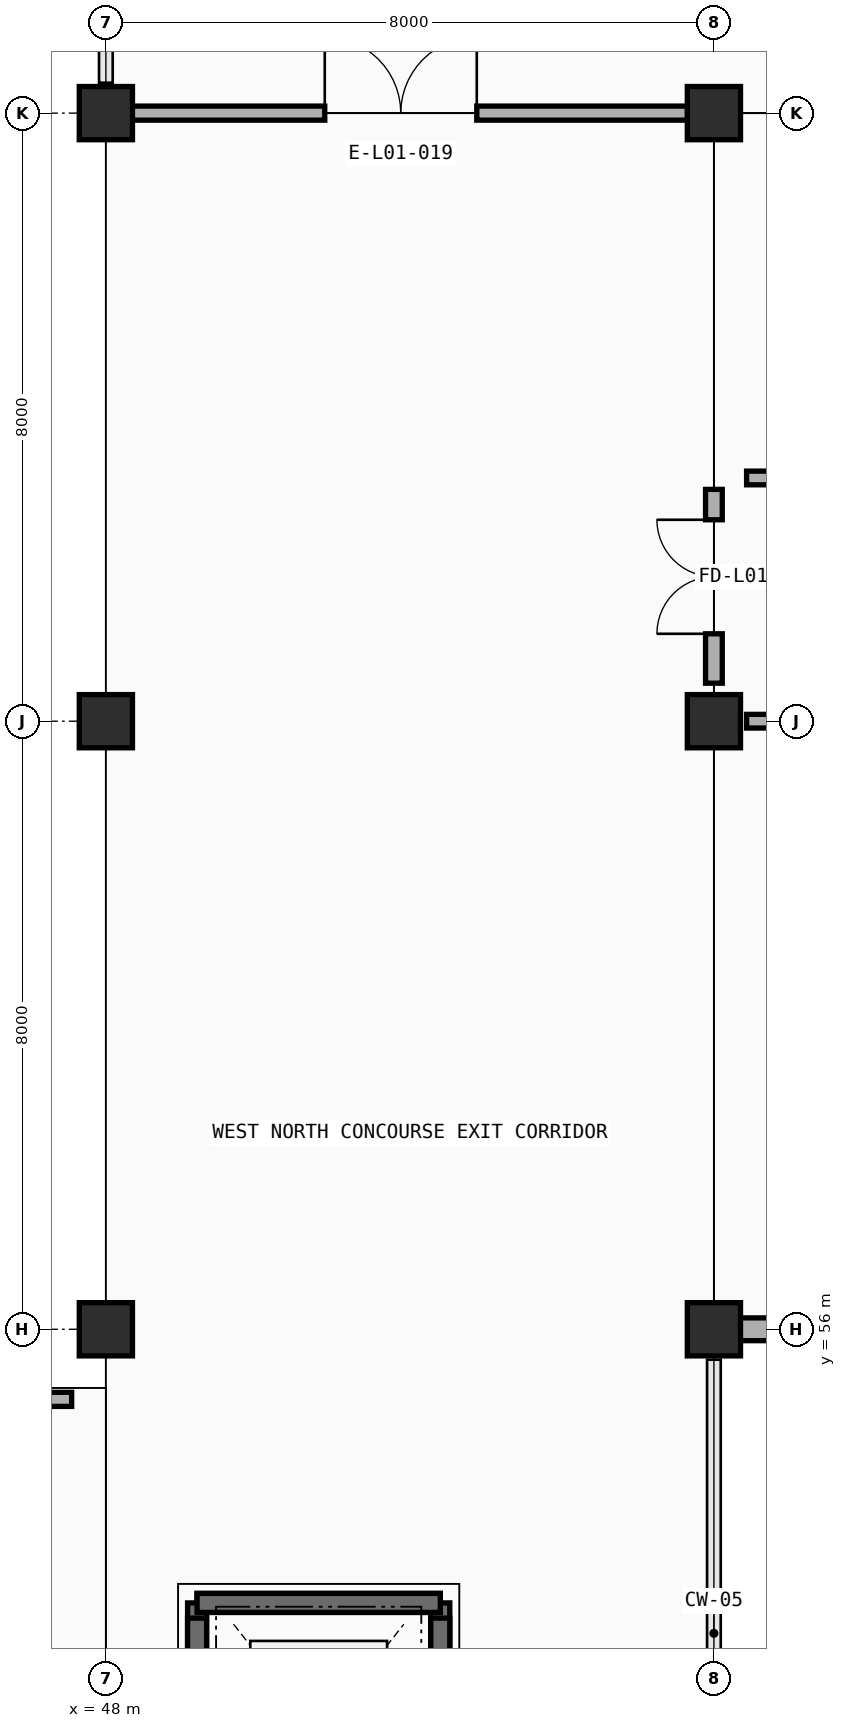
"""IFC4 building model, lengths in metres.
Left out: names, types, materials, properties, quantities, classifications, styles, units other than length and angle.
Written with IfcOpenShell. Run it as: python <this file> out.ifc"""

import sys

from ifc_helpers import new_model, si_unit, direction, frame, frame_2d, origin, origin_2d, place, context, subcontext, project, spatial, rectangle, extrude, element, fill, save


model = new_model("IFC4")
c1 = context("Model", 3, precision=1e-05, world=origin(), true_north=direction((0.0, 1.0)))
c2 = subcontext(c1, "Body", "Model", "MODEL_VIEW")
j1 = project(units=[si_unit("LENGTHUNIT", "METRE"), si_unit("PLANEANGLEUNIT", "RADIAN")], contexts=[c1])
p1 = place(None, origin())
s1 = spatial("IfcSite", under=j1, at=p1, CompositionType="ELEMENT")
p2 = place(p1, origin())
s2 = spatial("IfcBuilding", under=s1, at=p2, CompositionType="ELEMENT")
p3 = place(p2, origin())
s3 = spatial("IfcBuildingStorey", under=s2, at=p3, CompositionType="ELEMENT", Elevation=0.0)
for number, where, z_axis, x_axis in (
    (1, (48.0, 56.0, 0.0), (0.0, 0.0, 1.0), (1.0, 0.0, 0.0)),
    (2, (56.0, 56.0, 0.0), (0.0, 0.0, 1.0), (1.0, 0.0, 0.0)),
    (3, (48.0, 64.0, 0.0), (0.0, 0.0, 1.0), (1.0, 0.0, 0.0)),
    (4, (56.0, 64.0, 0.0), (0.0, 0.0, 1.0), (1.0, 0.0, 0.0)),
    (5, (48.0, 72.0, 0.0), (0.0, 0.0, 1.0), (1.0, 0.0, 0.0)),
    (6, (56.0, 72.0, 0.0), (0.0, 0.0, 1.0), (1.0, 0.0, 0.0)),
):
    element("IfcColumn", number, at=place(p3, frame(where, z_axis=z_axis, x_axis=x_axis)), inside=s3, PredefinedType="COLUMN", context=c2, shape_type="SweptSolid", body=[
        extrude(rectangle(XDim=0.7, YDim=0.7, at=origin_2d()), origin(), (0.0, 0.0, 1.0), 4.8),
    ])
p4 = place(p3, frame((63.628, 56.0, 0.0), z_axis=(0.0, 0.0, 1.0), x_axis=(-1.0, 0.0, 0.0)))
e7 = element("IfcWall", 7, at=p4, inside=s3, PredefinedType="STANDARD", context=c2, shape_type="SweptSolid", body=[
    extrude(rectangle(XDim=7.281, YDim=0.3, at=frame_2d((3.641, 0.0))), origin(), (0.0, 0.0, 1.0), 3.91),
])
p5 = place(p4, frame((2.208, 0.0, 0.9)))
e8 = element("IfcOpeningElement", 8, at=p5, cuts=e7, PredefinedType="OPENING", context=c2, shape_type="SweptSolid", body=[
    extrude(rectangle(XDim=2.45, YDim=1.85, at=frame_2d((1.225, 0.925))), frame((0.0, 0.16, 0.0), z_axis=(0.0, -1.0, 0.0), x_axis=(1.0, 0.0, 0.0)), (0.0, 0.0, 1.0), 0.32),
])
p6 = place(p3, frame((48.347, 72.0, 0.0), z_axis=(0.0, 0.0, 1.0), x_axis=(1.0, 0.0, 0.0)))
e9 = element("IfcWall", 9, at=p6, inside=s3, PredefinedType="STANDARD", context=c2, shape_type="SweptSolid", body=[
    extrude(rectangle(XDim=7.306, YDim=0.185, at=frame_2d((3.653, 0.0))), origin(), (0.0, 0.0, 1.0), 3.91),
])
p7 = place(p6, frame((2.533, 0.0, 0.0)))
e10 = element("IfcOpeningElement", 10, at=p7, cuts=e9, PredefinedType="OPENING", context=c2, shape_type="SweptSolid", body=[
    extrude(rectangle(XDim=2.0, YDim=2.4, at=frame_2d((1.0, 1.2))), frame((0.0, 0.103, 0.0), z_axis=(0.0, -1.0, 0.0), x_axis=(1.0, 0.0, 0.0)), (0.0, 0.0, 1.0), 0.205),
])
p8 = place(p3, frame((42.372, 55.078, 0.0), z_axis=(0.0, 0.0, 1.0), x_axis=(1.0, 0.0, 0.0)))
e11 = element("IfcWall", 11, at=p8, inside=s3, PredefinedType="STANDARD", context=c2, shape_type="SweptSolid", body=[
    extrude(rectangle(XDim=5.178, YDim=0.185, at=frame_2d((2.589, 0.0))), origin(), (0.0, 0.0, 1.0), 3.925),
])
p9 = place(p8, frame((1.878, 0.0, 0.9)))
e12 = element("IfcOpeningElement", 12, at=p9, cuts=e11, PredefinedType="OPENING", context=c2, shape_type="SweptSolid", body=[
    extrude(rectangle(XDim=1.25, YDim=1.25, at=frame_2d((0.625, 0.625))), frame((0.0, 0.103, 0.0), z_axis=(0.0, -1.0, 0.0), x_axis=(1.0, 0.0, 0.0)), (0.0, 0.0, 1.0), 0.205),
])
p10 = place(p3, frame((52.4, 49.0, -1.5), z_axis=(0.0, 0.0, 1.0), x_axis=(0.0, 1.0, 0.0)))
e13 = element("IfcWall", 13, at=p10, inside=s3, PredefinedType="SOLIDWALL", context=c2, shape_type="SweptSolid", body=[
    extrude(rectangle(XDim=3.4, YDim=0.25, at=frame_2d((1.7, 0.0))), origin(), (0.0, 0.0, 1.0), 1.5),
])
p11 = place(p3, frame((52.4, 52.4, -1.5), z_axis=(0.0, 0.0, 1.0), x_axis=(-1.0, 0.0, 0.0)))
e14 = element("IfcWall", 14, at=p11, inside=s3, PredefinedType="SOLIDWALL", context=c2, shape_type="SweptSolid", body=[
    extrude(rectangle(XDim=3.2, YDim=0.25, at=frame_2d((1.6, 0.0))), origin(), (0.0, 0.0, 1.0), 1.5),
])
p12 = place(p3, frame((49.2, 52.4, -1.5), z_axis=(0.0, 0.0, 1.0), x_axis=(0.0, -1.0, 0.0)))
e15 = element("IfcWall", 15, at=p12, inside=s3, PredefinedType="SOLIDWALL", context=c2, shape_type="SweptSolid", body=[
    extrude(rectangle(XDim=3.4, YDim=0.25, at=frame_2d((1.7, 0.0))), origin(), (0.0, 0.0, 1.0), 1.5),
])
p13 = place(p3, frame((49.2, 52.4, 0.0), z_axis=(0.0, 0.0, 1.0), x_axis=(1.0, 0.0, 0.0)))
e16 = element("IfcWall", 16, at=p13, inside=s3, PredefinedType="SOLIDWALL", context=c2, shape_type="SweptSolid", body=[
    extrude(rectangle(XDim=3.2, YDim=0.25, at=frame_2d((1.6, 0.0))), origin(), (0.0, 0.0, 1.0), 4.8),
])
for number, where, z_axis, x_axis in (
    (17, (49.2, 49.2, 0.0), (0.0, 0.0, 1.0), (0.0, 1.0, 0.0)),
    (18, (52.4, 49.2, 0.0), (0.0, 0.0, 1.0), (0.0, 1.0, 0.0)),
):
    element("IfcWall", number, at=place(p3, frame(where, z_axis=z_axis, x_axis=x_axis)), inside=s3, PredefinedType="SOLIDWALL", context=c2, shape_type="SweptSolid", body=[
        extrude(rectangle(XDim=3.0, YDim=0.25, at=frame_2d((1.5, 0.0))), origin(), (0.0, 0.0, 1.0), 4.8),
    ])
p14 = place(p3, frame((56.43, 64.0, 0.0), z_axis=(0.0, 0.0, 1.0), x_axis=(1.0, 0.0, 0.0)))
e19 = element("IfcWall", 19, at=p14, inside=s3, PredefinedType="PARTITIONING", context=c2, shape_type="SweptSolid", body=[
    extrude(rectangle(XDim=23.14, YDim=0.18, at=frame_2d((11.57, 0.0))), origin(), (0.0, 0.0, 1.0), 3.81),
])
p15 = place(p14, frame((2.92, 0.0, 0.0)))
e20 = element("IfcOpeningElement", 20, at=p15, cuts=e19, PredefinedType="OPENING", context=c2, shape_type="SweptSolid", body=[
    extrude(rectangle(XDim=1.3, YDim=2.18, at=frame_2d((0.65, 1.09))), frame((0.0, 0.1, 0.0), z_axis=(0.0, -1.0, 0.0), x_axis=(1.0, 0.0, 0.0)), (0.0, 0.0, 1.0), 0.2),
])
p16 = place(p3, frame((56.43, 67.2, 0.0), z_axis=(0.0, 0.0, 1.0), x_axis=(1.0, 0.0, 0.0)))
e21 = element("IfcWall", 21, at=p16, inside=s3, PredefinedType="PARTITIONING", context=c2, shape_type="SweptSolid", body=[
    extrude(rectangle(XDim=23.14, YDim=0.18, at=frame_2d((11.57, 0.0))), origin(), (0.0, 0.0, 1.0), 3.9),
])
p17 = place(p16, frame((2.995, 0.0, 0.0)))
e22 = element("IfcOpeningElement", 22, at=p17, cuts=e21, PredefinedType="OPENING", context=c2, shape_type="SweptSolid", body=[
    extrude(rectangle(XDim=1.15, YDim=2.15, at=frame_2d((0.575, 1.075))), frame((0.0, 0.1, 0.0), z_axis=(0.0, -1.0, 0.0), x_axis=(1.0, 0.0, 0.0)), (0.0, 0.0, 1.0), 0.2),
])
p18 = place(p3, frame((56.0, 64.5, 0.0), z_axis=(0.0, 0.0, 1.0), x_axis=(0.0, 1.0, 0.0)))
e23 = element("IfcWall", 23, at=p18, inside=s3, PredefinedType="PARTITIONING", context=c2, shape_type="SweptSolid", body=[
    extrude(rectangle(XDim=2.55, YDim=0.22, at=frame_2d((1.275, 0.0))), origin(), (0.0, 0.0, 1.0), 3.76),
])
p19 = place(p18, frame((0.65, 0.0, 0.0)))
e24 = element("IfcOpeningElement", 24, at=p19, cuts=e23, PredefinedType="OPENING", context=c2, shape_type="SweptSolid", body=[
    extrude(rectangle(XDim=1.5, YDim=2.2, at=frame_2d((0.75, 1.1))), frame((0.0, 0.12, 0.0), z_axis=(0.0, -1.0, 0.0), x_axis=(1.0, 0.0, 0.0)), (0.0, 0.0, 1.0), 0.24),
])
p20 = place(p7, origin())
e25 = element("IfcDoor", 25, at=p20, inside=s3, OperationType="DOUBLE_DOOR_SINGLE_SWING", PredefinedType="DOOR", context=c2, shape_type="SweptSolid", body=[
    extrude(rectangle(XDim=2.0, YDim=2.4, at=frame_2d((1.0, 1.2))), frame((0.0, 0.025, 0.0), z_axis=(0.0, -1.0, 0.0), x_axis=(1.0, 0.0, 0.0)), (0.0, 0.0, 1.0), 0.05),
])
fill(e10, e25)
p21 = place(p19, origin())
e26 = element("IfcDoor", 26, at=p21, inside=s3, OperationType="DOUBLE_DOOR_SINGLE_SWING", PredefinedType="DOOR", context=c2, shape_type="SweptSolid", body=[
    extrude(rectangle(XDim=1.5, YDim=2.2, at=frame_2d((0.75, 1.1))), frame((0.0, 0.025, 0.0), z_axis=(0.0, -1.0, 0.0), x_axis=(1.0, 0.0, 0.0)), (0.0, 0.0, 1.0), 0.05),
])
fill(e24, e26)
save(model, sys.argv[1])
